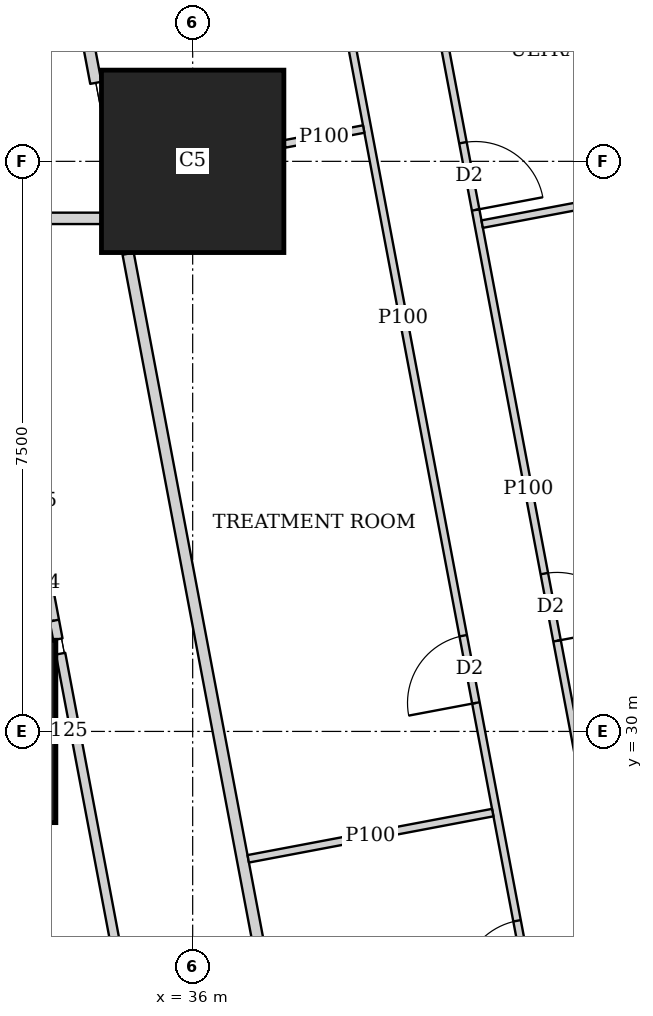
"""IFC4 building model, lengths in metres.
Left out: names, types, materials, properties, quantities, classifications, styles, units other than length and angle.
Written with IfcOpenShell. Run it as: python <this file> out.ifc"""

import sys

from ifc_helpers import new_model, si_unit, direction, frame, frame_2d, origin, origin_2d, place, context, subcontext, project, spatial, rectangle, extrude, element, fill, save


model = new_model("IFC4")
c1 = context("Model", 3, precision=1e-05, world=origin(), true_north=direction((0.0, 1.0)))
c2 = subcontext(c1, "Body", "Model", "MODEL_VIEW")
j1 = project(units=[si_unit("LENGTHUNIT", "METRE"), si_unit("PLANEANGLEUNIT", "RADIAN")], contexts=[c1])
p1 = place(None, origin())
s1 = spatial("IfcSite", under=j1, at=p1, CompositionType="ELEMENT")
p2 = place(p1, origin())
s2 = spatial("IfcBuilding", under=s1, at=p2, CompositionType="ELEMENT")
p3 = place(p2, frame((0.0, 0.0, 10.1)))
s3 = spatial("IfcBuildingStorey", under=s2, at=p3, CompositionType="ELEMENT", Elevation=10.1)
for number, where, z_axis, x_axis in (
    (1, (33.0, 30.0, 0.0), (0.0, 0.0, 1.0), (1.0, 0.0, 0.0)),
    (2, (36.0, 37.5, 0.0), (0.0, 0.0, 1.0), (1.0, 0.0, 0.0)),
):
    element("IfcColumn", number, at=place(p3, frame(where, z_axis=z_axis, x_axis=x_axis)), inside=s3, PredefinedType="COLUMN", context=c2, shape_type="SweptSolid", body=[
        extrude(rectangle(XDim=2.4, YDim=2.4, at=origin_2d()), origin(), (0.0, 0.0, 1.0), 4.5),
    ])
p4 = place(p3, frame((30.001, 36.75, 0.0), z_axis=(0.0, 0.0, 1.0), x_axis=(1.0, 0.0, 0.0)))
e3 = element("IfcWall", 3, at=p4, inside=s3, PredefinedType="SOLIDWALL", context=c2, shape_type="SweptSolid", body=[
    extrude(rectangle(XDim=4.798, YDim=0.15, at=frame_2d((2.399, 0.0))), origin(), (0.0, 0.0, 1.0), 2.6),
])
p5 = place(p3, frame((33.382, 45.65, 0.0), z_axis=(0.0, 0.0, 1.0), x_axis=(0.185564463355, -0.982632092871, 0.0)))
e4 = element("IfcWall", 4, at=p5, inside=s3, PredefinedType="SOLIDWALL", context=c2, shape_type="SweptSolid", body=[
    extrude(rectangle(XDim=7.243, YDim=0.15, at=frame_2d((3.621, 0.0))), origin(), (0.0, 0.0, 1.0), 2.4),
])
p6 = place(p3, frame((35.151, 36.285, 0.0), z_axis=(0.0, 0.0, 1.0), x_axis=(0.18558085056, -0.982628998099, 0.0)))
e5 = element("IfcWall", 5, at=p6, inside=s3, PredefinedType="SOLIDWALL", context=c2, shape_type="SweptSolid", body=[
    extrude(rectangle(XDim=34.352, YDim=0.15, at=frame_2d((17.176, 0.0))), origin(), (0.0, 0.0, 1.0), 2.4),
])
p7 = place(p6, frame((13.189, 0.0, 0.0)))
e6 = element("IfcOpeningElement", 6, at=p7, cuts=e5, PredefinedType="OPENING", context=c2, shape_type="SweptSolid", body=[
    extrude(rectangle(XDim=1.3, YDim=2.1, at=frame_2d((0.65, 1.05))), frame((0.0, 0.085, 0.0), z_axis=(0.0, -1.0, 0.0), x_axis=(1.0, 0.0, 0.0)), (0.0, 0.0, 1.0), 0.17),
])
p8 = place(p6, frame((19.443, 0.0, 0.0)))
e7 = element("IfcOpeningElement", 7, at=p8, cuts=e5, PredefinedType="OPENING", context=c2, shape_type="SweptSolid", body=[
    extrude(rectangle(XDim=1.3, YDim=2.1, at=frame_2d((0.65, 1.05))), frame((0.0, 0.085, 0.0), z_axis=(0.0, -1.0, 0.0), x_axis=(1.0, 0.0, 0.0)), (0.0, 0.0, 1.0), 0.17),
])
p9 = place(p6, frame((25.444, 0.0, 0.0)))
e8 = element("IfcOpeningElement", 8, at=p9, cuts=e5, PredefinedType="OPENING", context=c2, shape_type="SweptSolid", body=[
    extrude(rectangle(XDim=1.3, YDim=2.1, at=frame_2d((0.65, 1.05))), frame((0.0, 0.085, 0.0), z_axis=(0.0, -1.0, 0.0), x_axis=(1.0, 0.0, 0.0)), (0.0, 0.0, 1.0), 0.17),
])
p10 = place(p3, frame((38.956, 40.92, 0.0), z_axis=(0.0, 0.0, 1.0), x_axis=(0.185636914727, -0.982618408077, 0.0)))
e9 = element("IfcWall", 9, at=p10, inside=s3, PredefinedType="PARTITIONING", context=c2, shape_type="SweptSolid", body=[
    extrude(rectangle(XDim=15.729, YDim=0.1, at=frame_2d((7.865, 0.0))), origin(), (0.0, 0.0, 1.0), 2.6),
])
p11 = place(p10, frame((14.679, 0.0, 0.0)))
e10 = element("IfcOpeningElement", 10, at=p11, cuts=e9, PredefinedType="OPENING", context=c2, shape_type="SweptSolid", body=[
    extrude(rectangle(XDim=0.9, YDim=2.1, at=frame_2d((0.45, 1.05))), frame((0.0, 0.06, 0.0), z_axis=(0.0, -1.0, 0.0), x_axis=(1.0, 0.0, 0.0)), (0.0, 0.0, 1.0), 0.12),
])
p12 = place(p10, frame((9.0, 0.0, 0.0)))
e11 = element("IfcOpeningElement", 11, at=p12, cuts=e9, PredefinedType="OPENING", context=c2, shape_type="SweptSolid", body=[
    extrude(rectangle(XDim=0.9, YDim=2.1, at=frame_2d((0.45, 1.05))), frame((0.0, 0.06, 0.0), z_axis=(0.0, -1.0, 0.0), x_axis=(1.0, 0.0, 0.0)), (0.0, 0.0, 1.0), 0.12),
])
p13 = place(p10, frame((3.231, 0.0, 0.0)))
e12 = element("IfcOpeningElement", 12, at=p13, cuts=e9, PredefinedType="OPENING", context=c2, shape_type="SweptSolid", body=[
    extrude(rectangle(XDim=0.9, YDim=2.1, at=frame_2d((0.45, 1.05))), frame((0.0, 0.06, 0.0), z_axis=(0.0, -1.0, 0.0), x_axis=(1.0, 0.0, 0.0)), (0.0, 0.0, 1.0), 0.12),
])
p14 = place(p3, frame((36.842, 45.65, 0.0), z_axis=(0.0, 0.0, 1.0), x_axis=(0.185559483963, -0.982633033188, 0.0)))
e13 = element("IfcWall", 13, at=p14, inside=s3, PredefinedType="PARTITIONING", context=c2, shape_type="SweptSolid", body=[
    extrude(rectangle(XDim=20.77, YDim=0.1, at=frame_2d((10.385, 0.0))), origin(), (0.0, 0.0, 1.0), 2.4),
])
p15 = place(p14, frame((18.462, 0.0, 0.0)))
e14 = element("IfcOpeningElement", 14, at=p15, cuts=e13, PredefinedType="OPENING", context=c2, shape_type="SweptSolid", body=[
    extrude(rectangle(XDim=0.9, YDim=2.1, at=frame_2d((0.45, 1.05))), frame((0.0, 0.06, 0.0), z_axis=(0.0, -1.0, 0.0), x_axis=(1.0, 0.0, 0.0)), (0.0, 0.0, 1.0), 0.12),
])
p16 = place(p14, frame((14.645, 0.0, 0.0)))
e15 = element("IfcOpeningElement", 15, at=p16, cuts=e13, PredefinedType="OPENING", context=c2, shape_type="SweptSolid", body=[
    extrude(rectangle(XDim=0.9, YDim=2.1, at=frame_2d((0.45, 1.05))), frame((0.0, 0.06, 0.0), z_axis=(0.0, -1.0, 0.0), x_axis=(1.0, 0.0, 0.0)), (0.0, 0.0, 1.0), 0.12),
])
p17 = place(p14, frame((5.655, 0.0, 0.0)))
e16 = element("IfcOpeningElement", 16, at=p17, cuts=e13, PredefinedType="OPENING", context=c2, shape_type="SweptSolid", body=[
    extrude(rectangle(XDim=0.9, YDim=2.1, at=frame_2d((0.45, 1.05))), frame((0.0, 0.06, 0.0), z_axis=(0.0, -1.0, 0.0), x_axis=(1.0, 0.0, 0.0)), (0.0, 0.0, 1.0), 0.12),
])
p18 = place(p3, frame((43.985, 37.463, 0.0), z_axis=(0.0, 0.0, 1.0), x_axis=(-0.982623519589, -0.185609856287, 0.0)))
e17 = element("IfcWall", 17, at=p18, inside=s3, PredefinedType="PARTITIONING", context=c2, shape_type="SweptSolid", body=[
    extrude(rectangle(XDim=4.25, YDim=0.1, at=frame_2d((2.125, 0.0))), origin(), (0.0, 0.0, 1.0), 2.4),
])
p19 = place(p3, frame((38.25, 37.925, 0.0), z_axis=(0.0, 0.0, 1.0), x_axis=(-0.982694151031, -0.185235540676, 0.0)))
e18 = element("IfcWall", 18, at=p19, inside=s3, PredefinedType="PARTITIONING", context=c2, shape_type="SweptSolid", body=[
    extrude(rectangle(XDim=1.058, YDim=0.1, at=frame_2d((0.529, 0.0))), origin(), (0.0, 0.0, 1.0), 4.2),
])
p20 = place(p3, frame((39.948, 28.932, 0.0), z_axis=(0.0, 0.0, 1.0), x_axis=(-0.982610347627, -0.185679575441, 0.0)))
e19 = element("IfcWall", 19, at=p20, inside=s3, PredefinedType="PARTITIONING", context=c2, shape_type="SweptSolid", body=[
    extrude(rectangle(XDim=3.274, YDim=0.1, at=frame_2d((1.637, 0.0))), origin(), (0.0, 0.0, 1.0), 2.6),
])
p21 = place(p3, frame((37.059, 16.213, 0.0), z_axis=(0.0, 0.0, 1.0), x_axis=(-0.185585225745, 0.982628171785, 0.0)))
e20 = element("IfcWall", 20, at=p21, inside=s3, PredefinedType="PARTITIONING", context=c2, shape_type="SweptSolid", body=[
    extrude(rectangle(XDim=15.072, YDim=0.125, at=frame_2d((7.536, 0.0))), origin(), (0.0, 0.0, 1.0), 2.6),
])
p22 = place(p21, frame((7.221, 0.0, 0.0)))
e21 = element("IfcOpeningElement", 21, at=p22, cuts=e20, PredefinedType="OPENING", context=c2, shape_type="SweptSolid", body=[
    extrude(rectangle(XDim=1.0, YDim=2.1, at=frame_2d((0.5, 1.05))), frame((0.0, 0.073, 0.0), z_axis=(0.0, -1.0, 0.0), x_axis=(1.0, 0.0, 0.0)), (0.0, 0.0, 1.0), 0.145),
])
p23 = place(p21, frame((0.25, 0.0, 0.0)))
e22 = element("IfcOpeningElement", 22, at=p23, cuts=e20, PredefinedType="OPENING", context=c2, shape_type="SweptSolid", body=[
    extrude(rectangle(XDim=1.0, YDim=2.1, at=frame_2d((0.5, 1.05))), frame((0.0, 0.073, 0.0), z_axis=(0.0, -1.0, 0.0), x_axis=(1.0, 0.0, 0.0)), (0.0, 0.0, 1.0), 0.145),
])
p24 = place(p21, frame((3.99, 0.0, 0.0)))
e23 = element("IfcOpeningElement", 23, at=p24, cuts=e20, PredefinedType="OPENING", context=c2, shape_type="SweptSolid", body=[
    extrude(rectangle(XDim=1.0, YDim=2.1, at=frame_2d((0.5, 1.05))), frame((0.0, 0.073, 0.0), z_axis=(0.0, -1.0, 0.0), x_axis=(1.0, 0.0, 0.0)), (0.0, 0.0, 1.0), 0.145),
])
p25 = place(p3, frame((34.226, 31.213, 0.0), z_axis=(0.0, 0.0, 1.0), x_axis=(-0.185694811189, 0.982607468472, 0.0)))
e24 = element("IfcWall", 24, at=p25, inside=s3, PredefinedType="PARTITIONING", context=c2, shape_type="SweptSolid", body=[
    extrude(rectangle(XDim=3.689, YDim=0.125, at=frame_2d((1.845, 0.0))), origin(), (0.0, 0.0, 1.0), 4.2),
])
p26 = place(p25, frame((0.25, 0.0, 0.0)))
e25 = element("IfcOpeningElement", 25, at=p26, cuts=e24, PredefinedType="OPENING", context=c2, shape_type="SweptSolid", body=[
    extrude(rectangle(XDim=1.0, YDim=2.1, at=frame_2d((0.5, 1.05))), frame((0.0, 0.073, 0.0), z_axis=(0.0, -1.0, 0.0), x_axis=(1.0, 0.0, 0.0)), (0.0, 0.0, 1.0), 0.145),
])
p27 = place(p3, frame((34.201, 30.0, 0.0), z_axis=(0.0, 0.0, 1.0), x_axis=(1.0, 0.0, 0.0)))
e26 = element("IfcWall", 26, at=p27, inside=s3, PredefinedType="PARTITIONING", context=c2, shape_type="SweptSolid", body=[
    extrude(rectangle(XDim=0.178, YDim=0.125, at=frame_2d((0.089, 0.0))), origin(), (0.0, 0.0, 1.0), 2.6),
])
p28 = place(p12, origin())
e27 = element("IfcDoor", 27, at=p28, inside=s3, OperationType="SINGLE_SWING_RIGHT", PredefinedType="DOOR", context=c2, shape_type="SweptSolid", body=[
    extrude(rectangle(XDim=0.9, YDim=2.1, at=frame_2d((0.45, 1.05))), frame((0.0, 0.025, 0.0), z_axis=(0.0, -1.0, 0.0), x_axis=(1.0, 0.0, 0.0)), (0.0, 0.0, 1.0), 0.05),
])
fill(e11, e27)
p29 = place(p13, origin())
e28 = element("IfcDoor", 28, at=p29, inside=s3, OperationType="SINGLE_SWING_RIGHT", PredefinedType="DOOR", context=c2, shape_type="SweptSolid", body=[
    extrude(rectangle(XDim=0.9, YDim=2.1, at=frame_2d((0.45, 1.05))), frame((0.0, 0.025, 0.0), z_axis=(0.0, -1.0, 0.0), x_axis=(1.0, 0.0, 0.0)), (0.0, 0.0, 1.0), 0.05),
])
fill(e12, e28)
p30 = place(p15, origin())
e29 = element("IfcDoor", 29, at=p30, inside=s3, OperationType="SINGLE_SWING_LEFT", PredefinedType="DOOR", context=c2, shape_type="SweptSolid", body=[
    extrude(rectangle(XDim=0.9, YDim=2.1, at=frame_2d((0.45, 1.05))), frame((0.0, 0.025, 0.0), z_axis=(0.0, -1.0, 0.0), x_axis=(1.0, 0.0, 0.0)), (0.0, 0.0, 1.0), 0.05),
])
fill(e14, e29)
p31 = place(p16, origin())
e30 = element("IfcDoor", 30, at=p31, inside=s3, OperationType="SINGLE_SWING_LEFT", PredefinedType="DOOR", context=c2, shape_type="SweptSolid", body=[
    extrude(rectangle(XDim=0.9, YDim=2.1, at=frame_2d((0.45, 1.05))), frame((0.0, 0.025, 0.0), z_axis=(0.0, -1.0, 0.0), x_axis=(1.0, 0.0, 0.0)), (0.0, 0.0, 1.0), 0.05),
])
fill(e15, e30)
p32 = place(p26, origin())
e31 = element("IfcDoor", 31, at=p32, inside=s3, OperationType="SINGLE_SWING_LEFT", PredefinedType="DOOR", context=c2, shape_type="SweptSolid", body=[
    extrude(rectangle(XDim=1.0, YDim=2.1, at=frame_2d((0.5, 1.05))), frame((0.0, 0.025, 0.0), z_axis=(0.0, -1.0, 0.0), x_axis=(1.0, 0.0, 0.0)), (0.0, 0.0, 1.0), 0.05),
])
fill(e25, e31)
save(model, sys.argv[1])
